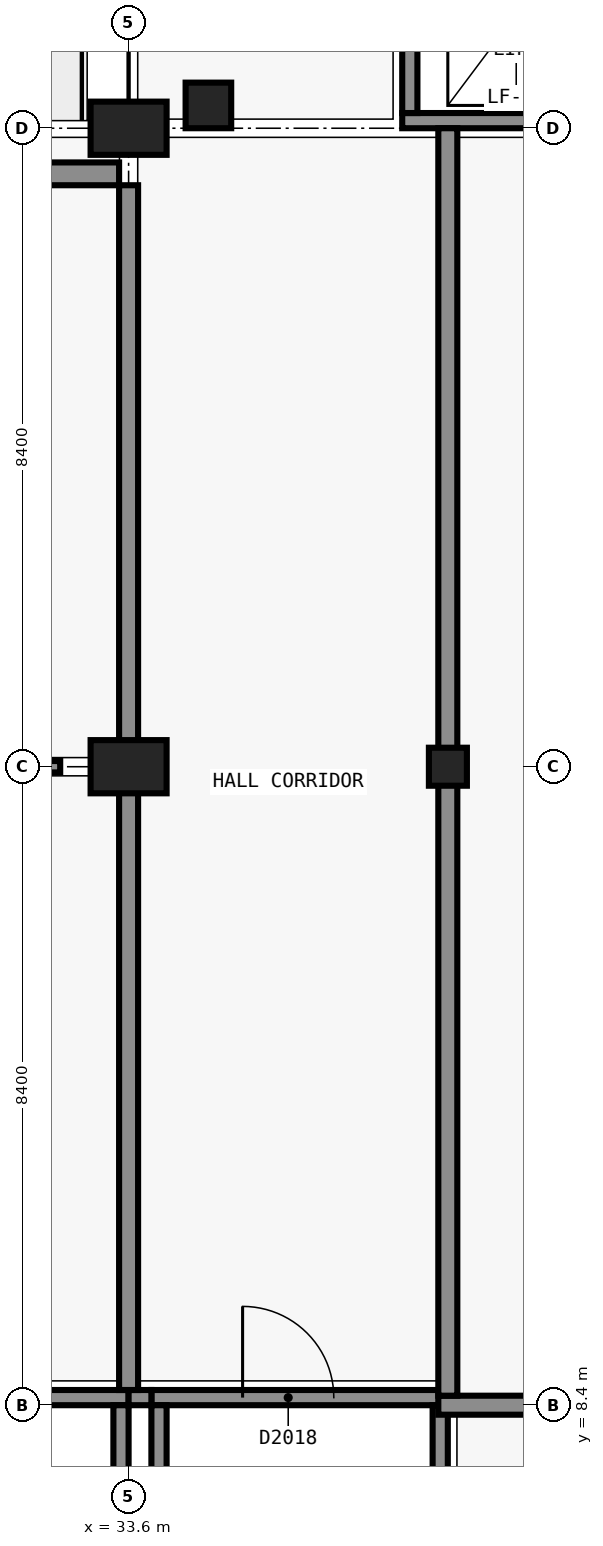
"""IFC4 building model, lengths in metres.
Left out: names, types, materials, properties, quantities, classifications, styles, units other than length and angle.
Written with IfcOpenShell. Run it as: python <this file> out.ifc"""

import sys

from ifc_helpers import new_model, si_unit, direction, frame, frame_2d, origin, origin_2d, place, context, subcontext, project, spatial, rectangle, extrude, element, fill, save


model = new_model("IFC4")
c1 = context("Model", 3, precision=1e-05, world=origin(), true_north=direction((0.0, 1.0)))
c2 = subcontext(c1, "Body", "Model", "MODEL_VIEW")
j1 = project(units=[si_unit("LENGTHUNIT", "METRE"), si_unit("PLANEANGLEUNIT", "RADIAN")], contexts=[c1])
p1 = place(None, origin())
s1 = spatial("IfcSite", under=j1, at=p1, CompositionType="ELEMENT")
p2 = place(p1, origin())
s2 = spatial("IfcBuilding", under=s1, at=p2, CompositionType="ELEMENT")
p3 = place(p2, frame((0.0, 0.0, 10.2)))
s3 = spatial("IfcBuildingStorey", under=s2, at=p3, CompositionType="ELEMENT", Elevation=10.2)
p4 = place(p3, frame((29.4, 8.5, 0.0), z_axis=(0.0, 0.0, 1.0), x_axis=(1.0, 0.0, 0.0)))
e1 = element("IfcWall", 1, at=p4, inside=s3, PredefinedType="SHEAR", context=c2, shape_type="SweptSolid", body=[
    extrude(rectangle(XDim=4.2, YDim=0.2, at=frame_2d((2.1, 0.0))), origin(), (0.0, 0.0, 1.0), 4.8),
])
p5 = place(p4, frame((1.5, 0.0, 0.0)))
e2 = element("IfcOpeningElement", 2, at=p5, cuts=e1, PredefinedType="OPENING", context=c2, shape_type="SweptSolid", body=[
    extrude(rectangle(XDim=1.2, YDim=2.1, at=frame_2d((0.6, 1.05))), frame((0.0, 0.11, 0.0), z_axis=(0.0, -1.0, 0.0), x_axis=(1.0, 0.0, 0.0)), (0.0, 0.0, 1.0), 0.22),
])
p6 = place(p3, frame((33.5, 8.4, 0.0), z_axis=(0.0, 0.0, 1.0), x_axis=(0.0, -1.0, 0.0)))
e3 = element("IfcWall", 3, at=p6, inside=s3, PredefinedType="SHEAR", context=c2, shape_type="SweptSolid", body=[
    extrude(rectangle(XDim=8.2, YDim=0.2, at=frame_2d((4.1, 0.0))), origin(), (0.0, 0.0, 1.0), 4.8),
])
p7 = place(p3, frame((33.9, 8.5, 0.0), z_axis=(0.0, 0.0, 1.0), x_axis=(1.0, 0.0, 0.0)))
e4 = element("IfcWall", 4, at=p7, inside=s3, PredefinedType="SHEAR", context=c2, shape_type="SweptSolid", body=[
    extrude(rectangle(XDim=3.9, YDim=0.2, at=frame_2d((1.95, 0.0))), origin(), (0.0, 0.0, 1.0), 4.8),
])
p8 = place(p7, frame((1.2, 0.0, 0.0)))
e5 = element("IfcOpeningElement", 5, at=p8, cuts=e4, PredefinedType="OPENING", context=c2, shape_type="SweptSolid", body=[
    extrude(rectangle(XDim=1.2, YDim=2.1, at=frame_2d((0.6, 1.05))), frame((0.0, 0.11, 0.0), z_axis=(0.0, -1.0, 0.0), x_axis=(1.0, 0.0, 0.0)), (0.0, 0.0, 1.0), 0.22),
])
p9 = place(p3, frame((34.0, 0.2, 0.0), z_axis=(0.0, 0.0, 1.0), x_axis=(0.0, 1.0, 0.0)))
e6 = element("IfcWall", 6, at=p9, inside=s3, PredefinedType="SHEAR", context=c2, shape_type="SweptSolid", body=[
    extrude(rectangle(XDim=8.2, YDim=0.2, at=frame_2d((4.1, 0.0))), origin(), (0.0, 0.0, 1.0), 4.8),
])
p10 = place(p3, frame((37.7, 8.4, 0.0), z_axis=(0.0, 0.0, 1.0), x_axis=(0.0, -1.0, 0.0)))
e7 = element("IfcWall", 7, at=p10, inside=s3, PredefinedType="SHEAR", context=c2, shape_type="SweptSolid", body=[
    extrude(rectangle(XDim=8.2, YDim=0.2, at=frame_2d((4.1, 0.0))), origin(), (0.0, 0.0, 1.0), 4.8),
])
p11 = place(p10, frame((0.9, 0.0, 0.0)))
e8 = element("IfcOpeningElement", 8, at=p11, cuts=e7, PredefinedType="OPENING", context=c2, shape_type="SweptSolid", body=[
    extrude(rectangle(XDim=1.2, YDim=2.1, at=frame_2d((0.6, 1.05))), frame((0.0, 0.11, 0.0), z_axis=(0.0, -1.0, 0.0), x_axis=(1.0, 0.0, 0.0)), (0.0, 0.0, 1.0), 0.22),
])
p12 = place(p3, frame((40.2, 25.3, 0.0), z_axis=(0.0, 0.0, 1.0), x_axis=(-1.0, 0.0, 0.0)))
e9 = element("IfcWall", 9, at=p12, inside=s3, PredefinedType="SHEAR", context=c2, shape_type="SweptSolid", body=[
    extrude(rectangle(XDim=3.0, YDim=0.2, at=frame_2d((1.5, 0.0))), origin(), (0.0, 0.0, 1.0), 4.8),
])
p13 = place(p3, frame((37.3, 25.4, 0.0), z_axis=(0.0, 0.0, 1.0), x_axis=(0.0, 1.0, 0.0)))
e10 = element("IfcWall", 10, at=p13, inside=s3, PredefinedType="SHEAR", context=c2, shape_type="SweptSolid", body=[
    extrude(rectangle(XDim=2.6, YDim=0.2, at=frame_2d((1.3, 0.0))), origin(), (0.0, 0.0, 1.0), 4.8),
])
for number, where, z_axis, x_axis in (
    (11, (33.6, 16.8, 0.0), (0.0, 0.0, 1.0), (0.0, 1.0, 0.0)),
    (12, (33.6, 25.2, 0.0), (0.0, 0.0, 1.0), (1.0, 0.0, 0.0)),
):
    element("IfcColumn", number, at=place(p3, frame(where, z_axis=z_axis, x_axis=x_axis)), inside=s3, PredefinedType="COLUMN", context=c2, shape_type="SweptSolid", body=[
        extrude(rectangle(XDim=1.0, YDim=0.7, at=origin_2d()), origin(), (0.0, 0.0, 1.0), 4.8),
    ])
p14 = place(p3, frame((34.65, 25.5, 0.0), z_axis=(0.0, 0.0, 1.0), x_axis=(1.0, 0.0, 0.0)))
e13 = element("IfcColumn", 13, at=p14, inside=s3, PredefinedType="COLUMN", context=c2, shape_type="SweptSolid", body=[
    extrude(rectangle(XDim=0.6, YDim=0.6, at=origin_2d()), origin(), (0.0, 0.0, 1.0), 4.8),
])
p15 = place(p3, frame((33.6, 8.5, 0.0), z_axis=(0.0, 0.0, 1.0), x_axis=(1.0, 0.0, 0.0)))
e14 = element("IfcWall", 14, at=p15, inside=s3, PredefinedType="SHEAR", context=c2, shape_type="SweptSolid", body=[
    extrude(rectangle(XDim=0.3, YDim=0.2, at=frame_2d((0.15, 0.0))), origin(), (0.0, 0.0, 1.0), 4.8),
])
p16 = place(p3, frame((37.801, 16.8, 0.0), z_axis=(0.0, 0.0, 1.0), x_axis=(1.0, 0.0, 0.0)))
e15 = element("IfcColumn", 15, at=p16, inside=s3, PredefinedType="COLUMN", context=c2, shape_type="SweptSolid", body=[
    extrude(rectangle(XDim=0.5, YDim=0.5, at=origin_2d()), origin(), (0.0, 0.0, 1.0), 4.8),
])
p17 = place(p3, frame((26.95, 24.6, 0.0), z_axis=(0.0, 0.0, 1.0), x_axis=(1.0, 0.0, 0.0)))
e16 = element("IfcWall", 16, at=p17, inside=s3, PredefinedType="SOLIDWALL", context=c2, shape_type="SweptSolid", body=[
    extrude(rectangle(XDim=6.525, YDim=0.3, at=frame_2d((3.262, 0.0))), origin(), (0.0, 0.0, 1.0), 4.5),
])
p18 = place(p17, frame((1.825, 0.0, 0.9)))
e17 = element("IfcOpeningElement", 17, at=p18, cuts=e16, PredefinedType="OPENING", context=c2, shape_type="SweptSolid", body=[
    extrude(rectangle(XDim=2.4, YDim=1.5, at=frame_2d((1.2, 0.75))), frame((0.0, 0.16, 0.0), z_axis=(0.0, -1.0, 0.0), x_axis=(1.0, 0.0, 0.0)), (0.0, 0.0, 1.0), 0.32),
])
p19 = place(p3, frame((37.675, 8.4, 0.0), z_axis=(0.0, 0.0, 1.0), x_axis=(1.0, 0.0, 0.0)))
e18 = element("IfcWall", 18, at=p19, inside=s3, PredefinedType="PARTITIONING", context=c2, shape_type="SweptSolid", body=[
    extrude(rectangle(XDim=12.85, YDim=0.25, at=frame_2d((6.425, 0.0))), origin(), (0.0, 0.0, 1.0), 3.8),
])
p20 = place(p19, frame((5.825, 0.0, 0.0)))
e19 = element("IfcOpeningElement", 19, at=p20, cuts=e18, PredefinedType="OPENING", context=c2, shape_type="SweptSolid", body=[
    extrude(rectangle(XDim=1.2, YDim=2.1, at=frame_2d((0.6, 1.05))), frame((0.0, 0.135, 0.0), z_axis=(0.0, -1.0, 0.0), x_axis=(1.0, 0.0, 0.0)), (0.0, 0.0, 1.0), 0.27),
])
p21 = place(p3, frame((33.6, 8.6, 0.0), z_axis=(0.0, 0.0, 1.0), x_axis=(0.0, 1.0, 0.0)))
e20 = element("IfcWall", 20, at=p21, inside=s3, PredefinedType="SOLIDWALL", context=c2, shape_type="SweptSolid", body=[
    extrude(rectangle(XDim=15.85, YDim=0.25, at=frame_2d((7.925, 0.0))), origin(), (0.0, 0.0, 1.0), 3.8),
])
p22 = place(p3, frame((37.8, 8.525, 0.0), z_axis=(0.0, 0.0, 1.0), x_axis=(0.0, 1.0, 0.0)))
e21 = element("IfcWall", 21, at=p22, inside=s3, PredefinedType="PARTITIONING", context=c2, shape_type="SweptSolid", body=[
    extrude(rectangle(XDim=16.675, YDim=0.25, at=frame_2d((8.337, 0.0))), origin(), (0.0, 0.0, 1.0), 3.8),
])
p23 = place(p3, frame((25.125, 16.8, 0.0), z_axis=(0.0, 0.0, 1.0), x_axis=(1.0, 0.0, 0.0)))
e22 = element("IfcWall", 22, at=p23, inside=s3, PredefinedType="PARTITIONING", context=c2, shape_type="SweptSolid", body=[
    extrude(rectangle(XDim=7.575, YDim=0.15, at=frame_2d((3.788, 0.0))), origin(), (0.0, 0.0, 1.0), 3.8),
])
p24 = place(p23, frame((3.775, 0.0, 0.0)))
e23 = element("IfcOpeningElement", 23, at=p24, cuts=e22, PredefinedType="OPENING", context=c2, shape_type="SweptSolid", body=[
    extrude(rectangle(XDim=1.0, YDim=2.1, at=frame_2d((0.5, 1.05))), frame((0.0, 0.085, 0.0), z_axis=(0.0, -1.0, 0.0), x_axis=(1.0, 0.0, 0.0)), (0.0, 0.0, 1.0), 0.17),
])
p25 = place(p8, origin())
e24 = element("IfcDoor", 24, at=p25, inside=s3, OperationType="SINGLE_SWING_RIGHT", PredefinedType="DOOR", context=c2, shape_type="SweptSolid", body=[
    extrude(rectangle(XDim=1.2, YDim=2.1, at=frame_2d((0.6, 1.05))), frame((0.0, 0.025, 0.0), z_axis=(0.0, -1.0, 0.0), x_axis=(1.0, 0.0, 0.0)), (0.0, 0.0, 1.0), 0.05),
])
fill(e5, e24)
save(model, sys.argv[1])
